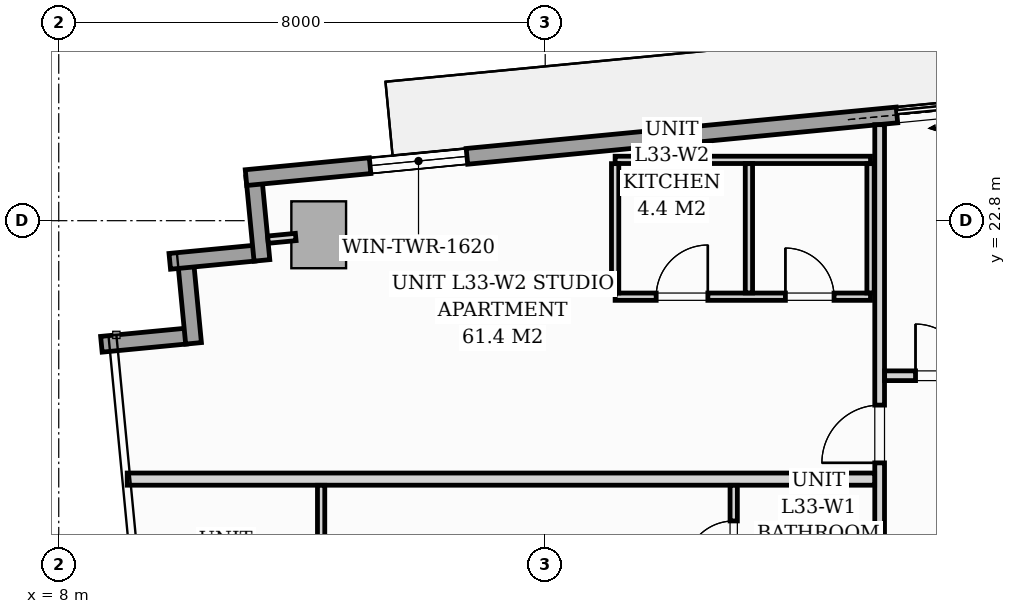
"""IFC4 building model, lengths in metres.
Left out: names, types, materials, properties, quantities, classifications, styles, units other than length and angle.
Written with IfcOpenShell. Run it as: python <this file> out.ifc"""

import sys

from ifc_helpers import new_model, si_unit, direction, frame, frame_2d, origin, origin_2d, place, context, subcontext, project, spatial, rectangle, extrude, source, transform, mapped, element, fill, save


model = new_model("IFC4")
c1 = context("Model", 3, precision=1e-05, world=origin(), true_north=direction((0.0, 1.0)))
c2 = subcontext(c1, "Body", "Model", "MODEL_VIEW")
j1 = project(units=[si_unit("LENGTHUNIT", "METRE"), si_unit("PLANEANGLEUNIT", "RADIAN")], contexts=[c1])
p1 = place(None, origin())
s1 = spatial("IfcSite", under=j1, at=p1, CompositionType="ELEMENT")
p2 = place(p1, origin())
s2 = spatial("IfcBuilding", under=s1, at=p2, CompositionType="ELEMENT")
p3 = place(p2, frame((0.0, 0.0, 116.2)))
s3 = spatial("IfcBuildingStorey", under=s2, at=p3, CompositionType="ELEMENT", Elevation=116.2)
m1 = source(origin(), c2, "Body", "SweptSolid", [
    extrude(rectangle(XDim=0.9, YDim=1.1, at=origin_2d()), origin(), (0.0, 0.0, 1.0), 3.194),
])
p4 = place(p3, frame((12.275, 22.568, 0.002), z_axis=(0.0, 0.0, 1.0), x_axis=(0.995396198367, 0.09584575252, 0.0)))
e1 = element("IfcColumn", 1, at=p4, inside=s3, PredefinedType="COLUMN", context=c2, shape_type="MappedRepresentation", body=[
    mapped(m1, transform((0.0, 0.0, 0.0), scale=1.0)),
])
for number, where, z_axis, x_axis in (
    (2, (8.701, 20.767, 0.0), (0.0, 0.0, 1.0), (0.995, 0.096, 0.0)),
    (3, (10.217, 20.783, 0.0), (0.0, 0.0, 1.0), (-0.096, 0.995, 0.0)),
):
    element("IfcWall", number, at=place(p3, frame(where, z_axis=z_axis, x_axis=x_axis)), inside=s3, PredefinedType="STANDARD", context=c2, shape_type="SweptSolid", body=[
        extrude(rectangle(XDim=1.395, YDim=0.26, at=frame_2d((0.698, 0.0))), origin(), (0.0, 0.0, 1.0), 2.9),
    ])
p5 = place(p3, frame((9.826, 22.131, 0.0), z_axis=(0.0, 0.0, 1.0), x_axis=(0.995389446633, 0.095915846097, 0.0)))
e4 = element("IfcWall", 4, at=p5, inside=s3, PredefinedType="STANDARD", context=c2, shape_type="SweptSolid", body=[
    extrude(rectangle(XDim=1.395, YDim=0.26, at=frame_2d((0.697, 0.0))), origin(), (0.0, 0.0, 1.0), 2.9),
])
p6 = place(p3, frame((11.341, 22.147, 0.0), z_axis=(0.0, 0.0, 1.0), x_axis=(-0.09589913835, 0.995391056452, 0.0)))
e5 = element("IfcWall", 5, at=p6, inside=s3, PredefinedType="STANDARD", context=c2, shape_type="SweptSolid", body=[
    extrude(rectangle(XDim=1.395, YDim=0.26, at=frame_2d((0.698, 0.0))), origin(), (0.0, 0.0, 1.0), 2.9),
])
p7 = place(p3, frame((11.08, 23.508, 0.0), z_axis=(0.0, 0.0, 1.0), x_axis=(0.995396638587, 0.095841180552, 0.0)))
e6 = element("IfcWall", 6, at=p7, inside=s3, PredefinedType="STANDARD", context=c2, shape_type="SweptSolid", body=[
    extrude(rectangle(XDim=19.11, YDim=0.26, at=frame_2d((9.555, 0.0))), origin(), (0.0, 0.0, 1.0), 2.9),
])
p8 = place(p7, frame((10.754, 0.0, 0.0)))
e7 = element("IfcOpeningElement", 7, at=p8, cuts=e6, PredefinedType="OPENING", context=c2, shape_type="SweptSolid", body=[
    extrude(rectangle(XDim=1.8, YDim=2.06, at=frame_2d((0.9, 1.03))), frame((0.0, 0.14, 0.0), z_axis=(0.0, -1.0, 0.0), x_axis=(1.0, 0.0, 0.0)), (0.0, 0.0, 1.0), 0.28),
])
p9 = place(p7, frame((2.05, 0.0, 0.65)))
e8 = element("IfcOpeningElement", 8, at=p9, cuts=e6, PredefinedType="OPENING", context=c2, shape_type="SweptSolid", body=[
    extrude(rectangle(XDim=1.6, YDim=1.5, at=frame_2d((0.8, 0.75))), frame((0.0, 0.14, 0.0), z_axis=(0.0, -1.0, 0.0), x_axis=(1.0, 0.0, 0.0)), (0.0, 0.0, 1.0), 0.28),
])
p10 = place(p3, frame((21.5, 12.732, 0.0), z_axis=(0.0, 0.0, 1.0), x_axis=(0.0, 1.0, 0.0)))
e9 = element("IfcWall", 9, at=p10, inside=s3, PredefinedType="PARTITIONING", context=c2, shape_type="SweptSolid", body=[
    extrude(rectangle(XDim=11.647, YDim=0.16, at=frame_2d((5.823, 0.0))), origin(), (0.0, 0.0, 1.0), 2.9),
])
p11 = place(p10, frame((0.493, 0.0, 0.0)))
e10 = element("IfcOpeningElement", 10, at=p11, cuts=e9, PredefinedType="OPENING", context=c2, shape_type="SweptSolid", body=[
    extrude(rectangle(XDim=0.95, YDim=2.06, at=frame_2d((0.475, 1.03))), frame((0.0, 0.09, 0.0), z_axis=(0.0, -1.0, 0.0), x_axis=(1.0, 0.0, 0.0)), (0.0, 0.0, 1.0), 0.18),
])
p12 = place(p10, frame((6.085, 0.0, 0.0)))
e11 = element("IfcOpeningElement", 11, at=p12, cuts=e9, PredefinedType="OPENING", context=c2, shape_type="SweptSolid", body=[
    extrude(rectangle(XDim=0.95, YDim=2.06, at=frame_2d((0.475, 1.03))), frame((0.0, 0.09, 0.0), z_axis=(0.0, -1.0, 0.0), x_axis=(1.0, 0.0, 0.0)), (0.0, 0.0, 1.0), 0.18),
])
p13 = place(p3, frame((9.126, 18.55, 0.0), z_axis=(0.0, 0.0, 1.0), x_axis=(1.0, 0.0, 0.0)))
e12 = element("IfcWall", 12, at=p13, inside=s3, PredefinedType="PARTITIONING", context=c2, shape_type="SweptSolid", body=[
    extrude(rectangle(XDim=12.292, YDim=0.2, at=frame_2d((6.146, 0.0))), origin(), (0.0, 0.0, 1.0), 2.9),
])
p14 = place(p3, frame((19.1, 14.5, 0.0), z_axis=(0.0, 0.0, 1.0), x_axis=(0.0, 1.0, 0.0)))
e13 = element("IfcWall", 13, at=p14, inside=s3, PredefinedType="PARTITIONING", context=c2, shape_type="SweptSolid", body=[
    extrude(rectangle(XDim=3.948, YDim=0.12, at=frame_2d((1.974, 0.0))), origin(), (0.0, 0.0, 1.0), 2.9),
])
p15 = place(p14, frame((0.563, 0.0, 0.0)))
e14 = element("IfcOpeningElement", 14, at=p15, cuts=e13, PredefinedType="OPENING", context=c2, shape_type="SweptSolid", body=[
    extrude(rectangle(XDim=0.8, YDim=2.0, at=frame_2d((0.4, 1.0))), frame((0.0, 0.07, 0.0), z_axis=(0.0, -1.0, 0.0), x_axis=(1.0, 0.0, 0.0)), (0.0, 0.0, 1.0), 0.14),
])
p16 = place(p14, frame((2.562, 0.0, 0.0)))
e15 = element("IfcOpeningElement", 15, at=p16, cuts=e13, PredefinedType="OPENING", context=c2, shape_type="SweptSolid", body=[
    extrude(rectangle(XDim=0.8, YDim=2.02, at=frame_2d((0.4, 1.01))), frame((0.0, 0.07, 0.0), z_axis=(0.0, -1.0, 0.0), x_axis=(1.0, 0.0, 0.0)), (0.0, 0.0, 1.0), 0.14),
])
p17 = place(p3, frame((12.315, 5.184, 0.0), z_axis=(0.0, 0.0, 1.0), x_axis=(0.0, 1.0, 0.0)))
e16 = element("IfcWall", 16, at=p17, inside=s3, PredefinedType="PARTITIONING", context=c2, shape_type="SweptSolid", body=[
    extrude(rectangle(XDim=13.264, YDim=0.12, at=frame_2d((6.632, 0.0))), origin(), (0.0, 0.0, 1.0), 2.9),
])
p18 = place(p17, frame((6.076, 0.0, 0.0)))
e17 = element("IfcOpeningElement", 17, at=p18, cuts=e16, PredefinedType="OPENING", context=c2, shape_type="SweptSolid", body=[
    extrude(rectangle(XDim=0.85, YDim=2.05, at=frame_2d((0.425, 1.025))), frame((0.0, 0.07, 0.0), z_axis=(0.0, -1.0, 0.0), x_axis=(1.0, 0.0, 0.0)), (0.0, 0.0, 1.0), 0.14),
])
p19 = place(p3, frame((17.15, 21.55, 0.0), z_axis=(0.0, 0.0, 1.0), x_axis=(1.0, 0.0, 0.0)))
e18 = element("IfcWall", 18, at=p19, inside=s3, PredefinedType="PARTITIONING", context=c2, shape_type="SweptSolid", body=[
    extrude(rectangle(XDim=4.2, YDim=0.12, at=frame_2d((2.1, 0.0))), origin(), (0.0, 0.0, 1.0), 2.9),
])
p20 = place(p19, frame((0.675, 0.0, 0.0)))
e19 = element("IfcOpeningElement", 19, at=p20, cuts=e18, PredefinedType="OPENING", context=c2, shape_type="SweptSolid", body=[
    extrude(rectangle(XDim=0.85, YDim=2.05, at=frame_2d((0.425, 1.025))), frame((0.0, 0.07, 0.0), z_axis=(0.0, -1.0, 0.0), x_axis=(1.0, 0.0, 0.0)), (0.0, 0.0, 1.0), 0.14),
])
p21 = place(p19, frame((2.8, 0.0, 0.0)))
e20 = element("IfcOpeningElement", 20, at=p21, cuts=e18, PredefinedType="OPENING", context=c2, shape_type="SweptSolid", body=[
    extrude(rectangle(XDim=0.8, YDim=2.02, at=frame_2d((0.4, 1.01))), frame((0.0, 0.07, 0.0), z_axis=(0.0, -1.0, 0.0), x_axis=(1.0, 0.0, 0.0)), (0.0, 0.0, 1.0), 0.14),
])
p22 = place(p3, frame((17.15, 23.8, 0.0), z_axis=(0.0, 0.0, 1.0), x_axis=(1.0, 0.0, 0.0)))
e21 = element("IfcWall", 21, at=p22, inside=s3, PredefinedType="PARTITIONING", context=c2, shape_type="SweptSolid", body=[
    extrude(rectangle(XDim=4.2, YDim=0.12, at=frame_2d((2.1, 0.0))), origin(), (0.0, 0.0, 1.0), 2.27),
])
for number, where, z_axis, x_axis in (
    (22, (17.15, 21.612, 0.0), (0.0, 0.0, 1.0), (0.0, 1.0, 0.0)),
    (23, (19.35, 21.612, 0.0), (0.0, 0.0, 1.0), (0.0, 1.0, 0.0)),
    (24, (21.35, 21.612, 0.0), (0.0, 0.0, 1.0), (0.0, 1.0, 0.0)),
):
    element("IfcWall", number, at=place(p3, frame(where, z_axis=z_axis, x_axis=x_axis)), inside=s3, PredefinedType="PARTITIONING", context=c2, shape_type="SweptSolid", body=[
        extrude(rectangle(XDim=2.126, YDim=0.12, at=frame_2d((1.063, 0.0))), origin(), (0.0, 0.0, 1.0), 2.9),
    ])
p23 = place(p3, frame((21.582, 20.25, 0.0), z_axis=(0.0, 0.0, 1.0), x_axis=(1.0, 0.0, 0.0)))
e25 = element("IfcWall", 25, at=p23, inside=s3, PredefinedType="PARTITIONING", context=c2, shape_type="SweptSolid", body=[
    extrude(rectangle(XDim=1.886, YDim=0.16, at=frame_2d((0.943, 0.0))), origin(), (0.0, 0.0, 1.0), 2.9),
])
p24 = place(p23, frame((0.508, 0.0, 0.0)))
e26 = element("IfcOpeningElement", 26, at=p24, cuts=e25, PredefinedType="OPENING", context=c2, shape_type="SweptSolid", body=[
    extrude(rectangle(XDim=0.85, YDim=2.0, at=frame_2d((0.425, 1.0))), frame((0.0, 0.09, 0.0), z_axis=(0.0, -1.0, 0.0), x_axis=(1.0, 0.0, 0.0)), (0.0, 0.0, 1.0), 0.18),
])
p25 = place(p3, frame((11.897, 22.532, 0.0), z_axis=(0.0, 0.0, 1.0), x_axis=(-0.995384576284, -0.09596637586, 0.0)))
e27 = element("IfcWall", 27, at=p25, inside=s3, PredefinedType="PARTITIONING", context=c2, shape_type="SweptSolid", body=[
    extrude(rectangle(XDim=0.458, YDim=0.12, at=frame_2d((0.229, 0.0))), origin(), (0.0, 0.0, 1.0), 2.9),
])
m2 = source(origin(), c2, "Body", "SweptSolid", [
    extrude(rectangle(XDim=1.8, YDim=2.06, at=frame_2d((0.9, 1.03))), frame((0.0, 0.025, 0.0), z_axis=(0.0, -1.0, 0.0), x_axis=(1.0, 0.0, 0.0)), (0.0, 0.0, 1.0), 0.05),
])
p26 = place(p8, origin())
e28 = element("IfcDoor", 28, at=p26, inside=s3, OperationType="SLIDING_TO_LEFT", PredefinedType="DOOR", context=c2, shape_type="MappedRepresentation", body=[
    mapped(m2, transform((0.0, 0.0, 0.0), scale=1.0)),
])
fill(e7, e28)
m3 = source(origin(), c2, "Body", "SweptSolid", [
    extrude(rectangle(XDim=1.6, YDim=1.5, at=frame_2d((0.8, 0.75))), frame((0.0, 0.03, 0.0), z_axis=(0.0, -1.0, 0.0), x_axis=(1.0, 0.0, 0.0)), (0.0, 0.0, 1.0), 0.06),
])
p27 = place(p9, origin())
e29 = element("IfcWindow", 29, at=p27, inside=s3, PartitioningType="SINGLE_PANEL", PredefinedType="WINDOW", context=c2, shape_type="MappedRepresentation", body=[
    mapped(m3, transform((0.0, 0.0, 0.0), scale=1.0)),
])
fill(e8, e29)
m4 = source(origin(), c2, "Body", "SweptSolid", [
    extrude(rectangle(XDim=0.8, YDim=2.02, at=frame_2d((0.4, 1.01))), frame((0.0, 0.025, 0.0), z_axis=(0.0, -1.0, 0.0), x_axis=(1.0, 0.0, 0.0)), (0.0, 0.0, 1.0), 0.05),
])
p28 = place(p16, origin())
e30 = element("IfcDoor", 30, at=p28, inside=s3, OperationType="SINGLE_SWING_LEFT", PredefinedType="DOOR", context=c2, shape_type="MappedRepresentation", body=[
    mapped(m4, transform((0.0, 0.0, 0.0), scale=1.0)),
])
fill(e15, e30)
m5 = source(origin(), c2, "Body", "SweptSolid", [
    extrude(rectangle(XDim=0.95, YDim=2.06, at=frame_2d((0.475, 1.03))), frame((0.0, 0.025, 0.0), z_axis=(0.0, -1.0, 0.0), x_axis=(1.0, 0.0, 0.0)), (0.0, 0.0, 1.0), 0.05),
])
p29 = place(p12, origin())
e31 = element("IfcDoor", 31, at=p29, inside=s3, OperationType="SINGLE_SWING_LEFT", PredefinedType="DOOR", context=c2, shape_type="MappedRepresentation", body=[
    mapped(m5, transform((0.0, 0.0, 0.0), scale=1.0)),
])
fill(e11, e31)
m6 = source(origin(), c2, "Body", "SweptSolid", [
    extrude(rectangle(XDim=0.85, YDim=2.05, at=frame_2d((0.425, 1.025))), frame((0.0, 0.025, 0.0), z_axis=(0.0, -1.0, 0.0), x_axis=(1.0, 0.0, 0.0)), (0.0, 0.0, 1.0), 0.05),
])
p30 = place(p20, origin())
e32 = element("IfcDoor", 32, at=p30, inside=s3, OperationType="SINGLE_SWING_RIGHT", PredefinedType="DOOR", context=c2, shape_type="MappedRepresentation", body=[
    mapped(m6, transform((0.0, 0.0, 0.0), scale=1.0)),
])
fill(e19, e32)
p31 = place(p21, origin())
e33 = element("IfcDoor", 33, at=p31, inside=s3, OperationType="SINGLE_SWING_LEFT", PredefinedType="DOOR", context=c2, shape_type="MappedRepresentation", body=[
    mapped(m4, transform((0.0, 0.0, 0.0), scale=1.0)),
])
fill(e20, e33)
m7 = source(origin(), c2, "Body", "SweptSolid", [
    extrude(rectangle(XDim=0.85, YDim=2.0, at=frame_2d((0.425, 1.0))), frame((0.0, 0.025, 0.0), z_axis=(0.0, -1.0, 0.0), x_axis=(1.0, 0.0, 0.0)), (0.0, 0.0, 1.0), 0.05),
])
p32 = place(p24, origin())
e34 = element("IfcDoor", 34, at=p32, inside=s3, OperationType="SINGLE_SWING_LEFT", PredefinedType="DOOR", context=c2, shape_type="MappedRepresentation", body=[
    mapped(m7, transform((0.0, 0.0, 0.0), scale=1.0)),
])
fill(e26, e34)
save(model, sys.argv[1])
